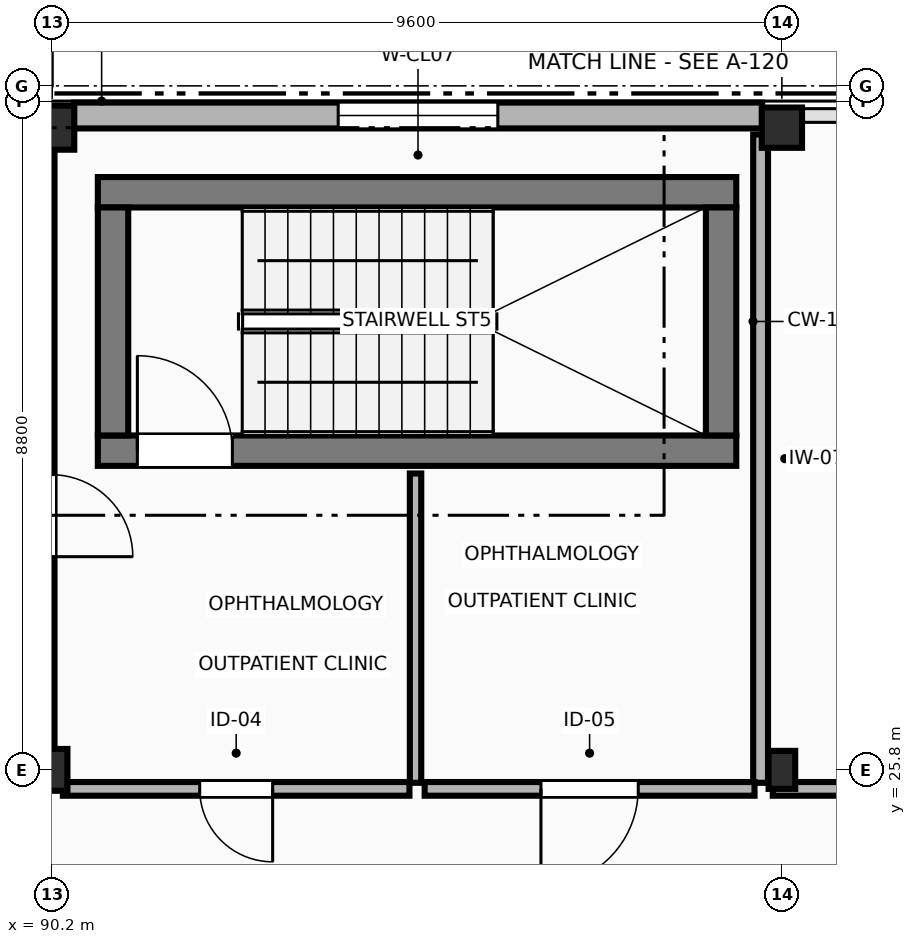
"""IFC4 building model, lengths in metres.
Left out: names, types, materials, properties, quantities, classifications, styles, units other than length and angle.
Written with IfcOpenShell. Run it as: python <this file> out.ifc"""

import sys

from ifc_helpers import new_model, si_unit, direction, frame, frame_2d, origin, origin_2d, place, context, subcontext, project, spatial, rectangle, extrude, element, fill, save


model = new_model("IFC4")
c1 = context("Model", 3, precision=1e-05, world=origin(), true_north=direction((0.0, 1.0)))
c2 = subcontext(c1, "Body", "Model", "MODEL_VIEW")
j1 = project(units=[si_unit("LENGTHUNIT", "METRE"), si_unit("PLANEANGLEUNIT", "RADIAN")], contexts=[c1])
p1 = place(None, origin())
s1 = spatial("IfcSite", under=j1, at=p1, CompositionType="ELEMENT")
p2 = place(p1, origin())
s2 = spatial("IfcBuilding", under=s1, at=p2, CompositionType="ELEMENT")
p3 = place(p2, frame((0.0, 0.0, 5.4)))
s3 = spatial("IfcBuildingStorey", under=s2, at=p3, CompositionType="ELEMENT", Elevation=5.4)
p4 = place(p3, frame((90.2, 25.8, 0.0), z_axis=(0.0, 0.0, 1.0), x_axis=(1.0, 0.0, 0.0)))
e1 = element("IfcColumn", 1, at=p4, inside=s3, PredefinedType="COLUMN", context=c2, shape_type="SweptSolid", body=[
    extrude(rectangle(XDim=0.4, YDim=0.55, at=origin_2d()), origin(), (0.0, 0.0, 1.0), 4.2),
])
p5 = place(p3, frame((90.2, 34.25, 0.0), z_axis=(0.0, 0.0, 1.0), x_axis=(1.0, 0.0, 0.0)))
e2 = element("IfcColumn", 2, at=p5, inside=s3, PredefinedType="COLUMN", context=c2, shape_type="SweptSolid", body=[
    extrude(rectangle(XDim=0.58, YDim=0.58, at=origin_2d()), origin(), (0.0, 0.0, 1.0), 4.2),
])
p6 = place(p3, frame((99.8, 25.8, 0.0), z_axis=(0.0, 0.0, 1.0), x_axis=(1.0, 0.0, 0.0)))
e3 = element("IfcColumn", 3, at=p6, inside=s3, PredefinedType="COLUMN", context=c2, shape_type="SweptSolid", body=[
    extrude(rectangle(XDim=0.35, YDim=0.5, at=origin_2d()), origin(), (0.0, 0.0, 1.0), 4.2),
])
p7 = place(p3, frame((99.8, 34.25, 0.0), z_axis=(0.0, 0.0, 1.0), x_axis=(1.0, 0.0, 0.0)))
e4 = element("IfcColumn", 4, at=p7, inside=s3, PredefinedType="COLUMN", context=c2, shape_type="SweptSolid", body=[
    extrude(rectangle(XDim=0.53, YDim=0.53, at=origin_2d()), origin(), (0.0, 0.0, 1.0), 4.2),
])
p8 = place(p3, frame((99.54, 34.41, 0.0), z_axis=(0.0, 0.0, 1.0), x_axis=(-1.0, 0.0, 0.0)))
e5 = element("IfcWall", 5, at=p8, inside=s3, PredefinedType="STANDARD", context=c2, shape_type="SweptSolid", body=[
    extrude(rectangle(XDim=9.055, YDim=0.34, at=frame_2d((4.527, 0.0))), origin(), (0.0, 0.0, 1.0), 3.185),
])
p9 = place(p8, frame((3.478, 0.0, 0.95)))
e6 = element("IfcOpeningElement", 6, at=p9, cuts=e5, PredefinedType="OPENING", context=c2, shape_type="SweptSolid", body=[
    extrude(rectangle(XDim=2.1, YDim=1.8, at=frame_2d((1.05, 0.9))), frame((0.0, 0.18, 0.0), z_axis=(0.0, -1.0, 0.0), x_axis=(1.0, 0.0, 0.0)), (0.0, 0.0, 1.0), 0.36),
])
p10 = place(p3, frame((90.8, 30.0, 0.0), z_axis=(0.0, 0.0, 1.0), x_axis=(1.0, 0.0, 0.0)))
e7 = element("IfcWall", 7, at=p10, inside=s3, PredefinedType="SHEAR", context=c2, shape_type="SweptSolid", body=[
    extrude(rectangle(XDim=8.4, YDim=0.4, at=frame_2d((4.2, 0.0))), origin(), (0.0, 0.0, 1.0), 3.92),
])
p11 = place(p10, frame((0.52, 0.0, 0.0)))
e8 = element("IfcOpeningElement", 8, at=p11, cuts=e7, PredefinedType="OPENING", context=c2, shape_type="SweptSolid", body=[
    extrude(rectangle(XDim=1.25, YDim=2.2, at=frame_2d((0.625, 1.1))), frame((0.0, 0.21, 0.0), z_axis=(0.0, -1.0, 0.0), x_axis=(1.0, 0.0, 0.0)), (0.0, 0.0, 1.0), 0.42),
])
p12 = place(p3, frame((99.2, 33.4, 0.0), z_axis=(0.0, 0.0, 1.0), x_axis=(-1.0, 0.0, 0.0)))
e9 = element("IfcWall", 9, at=p12, inside=s3, PredefinedType="SHEAR", context=c2, shape_type="SweptSolid", body=[
    extrude(rectangle(XDim=8.4, YDim=0.4, at=frame_2d((4.2, 0.0))), origin(), (0.0, 0.0, 1.0), 3.92),
])
for number, where, z_axis, x_axis in (
    (10, (91.0, 30.2, 0.0), (0.0, 0.0, 1.0), (0.0, 1.0, 0.0)),
    (11, (99.0, 33.2, 0.0), (0.0, 0.0, 1.0), (0.0, -1.0, 0.0)),
):
    element("IfcWall", number, at=place(p3, frame(where, z_axis=z_axis, x_axis=x_axis)), inside=s3, PredefinedType="SHEAR", context=c2, shape_type="SweptSolid", body=[
        extrude(rectangle(XDim=3.0, YDim=0.4, at=frame_2d((1.5, 0.0))), origin(), (0.0, 0.0, 1.0), 3.92),
    ])
p13 = place(p3, frame((90.18, 34.16, 0.0), z_axis=(0.0, 0.0, 1.0), x_axis=(0.0, -1.0, 0.0)))
e12 = element("IfcWall", 12, at=p13, inside=s3, PredefinedType="PARTITIONING", context=c2, shape_type="SweptSolid", body=[
    extrude(rectangle(XDim=8.53, YDim=0.1, at=frame_2d((4.265, 0.0))), origin(), (0.0, 0.0, 1.0), 3.365),
])
p14 = place(p13, frame((4.475, 0.0, 0.0)))
e13 = element("IfcOpeningElement", 13, at=p14, cuts=e12, PredefinedType="OPENING", context=c2, shape_type="SweptSolid", body=[
    extrude(rectangle(XDim=1.08, YDim=2.2, at=frame_2d((0.54, 1.1))), frame((0.0, 0.06, 0.0), z_axis=(0.0, -1.0, 0.0), x_axis=(1.0, 0.0, 0.0)), (0.0, 0.0, 1.0), 0.12),
])
p15 = place(p3, frame((94.98, 29.7, 0.0), z_axis=(0.0, 0.0, 1.0), x_axis=(0.0, -1.0, 0.0)))
e14 = element("IfcWall", 14, at=p15, inside=s3, PredefinedType="PARTITIONING", context=c2, shape_type="SweptSolid", body=[
    extrude(rectangle(XDim=4.07, YDim=0.15, at=frame_2d((2.035, 0.0))), origin(), (0.0, 0.0, 1.0), 3.92),
])
p16 = place(p3, frame((94.9, 25.55, 0.0), z_axis=(0.0, 0.0, 1.0), x_axis=(-1.0, 0.0, 0.0)))
e15 = element("IfcWall", 15, at=p16, inside=s3, PredefinedType="PARTITIONING", context=c2, shape_type="SweptSolid", body=[
    extrude(rectangle(XDim=4.56, YDim=0.18, at=frame_2d((2.28, 0.0))), origin(), (0.0, 0.0, 1.0), 3.225),
])
p17 = place(p16, frame((1.8, 0.0, 0.0)))
e16 = element("IfcOpeningElement", 16, at=p17, cuts=e15, PredefinedType="OPENING", context=c2, shape_type="SweptSolid", body=[
    extrude(rectangle(XDim=0.96, YDim=2.1, at=frame_2d((0.48, 1.05))), frame((0.0, 0.1, 0.0), z_axis=(0.0, -1.0, 0.0), x_axis=(1.0, 0.0, 0.0)), (0.0, 0.0, 1.0), 0.2),
])
p18 = place(p3, frame((99.52, 34.16, 0.0), z_axis=(0.0, 0.0, 1.0), x_axis=(0.0, -1.0, 0.0)))
e17 = element("IfcWall", 17, at=p18, inside=s3, PredefinedType="PARTITIONING", context=c2, shape_type="SweptSolid", body=[
    extrude(rectangle(XDim=8.53, YDim=0.195, at=frame_2d((4.265, 0.0))), origin(), (0.0, 0.0, 1.0), 3.405),
])
p19 = place(p3, frame((99.44, 25.55, 0.0), z_axis=(0.0, 0.0, 1.0), x_axis=(-1.0, 0.0, 0.0)))
e18 = element("IfcWall", 18, at=p19, inside=s3, PredefinedType="PARTITIONING", context=c2, shape_type="SweptSolid", body=[
    extrude(rectangle(XDim=4.34, YDim=0.18, at=frame_2d((2.17, 0.0))), origin(), (0.0, 0.0, 1.0), 3.225),
])
p20 = place(p19, frame((1.53, 0.0, 0.0)))
e19 = element("IfcOpeningElement", 19, at=p20, cuts=e18, PredefinedType="OPENING", context=c2, shape_type="SweptSolid", body=[
    extrude(rectangle(XDim=1.28, YDim=2.25, at=frame_2d((0.64, 1.125))), frame((0.0, 0.1, 0.0), z_axis=(0.0, -1.0, 0.0), x_axis=(1.0, 0.0, 0.0)), (0.0, 0.0, 1.0), 0.2),
])
p21 = place(p3, frame((108.78, 25.55, 0.0), z_axis=(0.0, 0.0, 1.0), x_axis=(-1.0, 0.0, 0.0)))
e20 = element("IfcWall", 20, at=p21, inside=s3, PredefinedType="PARTITIONING", context=c2, shape_type="SweptSolid", body=[
    extrude(rectangle(XDim=9.1, YDim=0.18, at=frame_2d((4.55, 0.0))), origin(), (0.0, 0.0, 1.0), 3.225),
])
p22 = place(p21, frame((3.86, 0.0, 0.0)))
e21 = element("IfcOpeningElement", 21, at=p22, cuts=e20, PredefinedType="OPENING", context=c2, shape_type="SweptSolid", body=[
    extrude(rectangle(XDim=1.38, YDim=2.25, at=frame_2d((0.69, 1.125))), frame((0.0, 0.1, 0.0), z_axis=(0.0, -1.0, 0.0), x_axis=(1.0, 0.0, 0.0)), (0.0, 0.0, 1.0), 0.2),
])
p23 = place(p9, origin())
e22 = element("IfcWindow", 22, at=p23, inside=s3, PartitioningType="SINGLE_PANEL", PredefinedType="WINDOW", context=c2, shape_type="SweptSolid", body=[
    extrude(rectangle(XDim=2.1, YDim=1.8, at=frame_2d((1.05, 0.9))), frame((0.0, 0.03, 0.0), z_axis=(0.0, -1.0, 0.0), x_axis=(1.0, 0.0, 0.0)), (0.0, 0.0, 1.0), 0.06),
])
fill(e6, e22)
p24 = place(p11, origin())
e23 = element("IfcDoor", 23, at=p24, inside=s3, OperationType="SINGLE_SWING_LEFT", PredefinedType="DOOR", context=c2, shape_type="SweptSolid", body=[
    extrude(rectangle(XDim=1.25, YDim=2.2, at=frame_2d((0.625, 1.1))), frame((0.0, 0.025, 0.0), z_axis=(0.0, -1.0, 0.0), x_axis=(1.0, 0.0, 0.0)), (0.0, 0.0, 1.0), 0.05),
])
fill(e8, e23)
p25 = place(p14, origin())
e24 = element("IfcDoor", 24, at=p25, inside=s3, OperationType="SINGLE_SWING_RIGHT", PredefinedType="DOOR", context=c2, shape_type="SweptSolid", body=[
    extrude(rectangle(XDim=1.08, YDim=2.2, at=frame_2d((0.54, 1.1))), frame((0.0, 0.025, 0.0), z_axis=(0.0, -1.0, 0.0), x_axis=(1.0, 0.0, 0.0)), (0.0, 0.0, 1.0), 0.05),
])
fill(e13, e24)
p26 = place(p17, origin())
e25 = element("IfcDoor", 25, at=p26, inside=s3, OperationType="SINGLE_SWING_LEFT", PredefinedType="DOOR", context=c2, shape_type="SweptSolid", body=[
    extrude(rectangle(XDim=0.96, YDim=2.1, at=frame_2d((0.48, 1.05))), frame((0.0, 0.025, 0.0), z_axis=(0.0, -1.0, 0.0), x_axis=(1.0, 0.0, 0.0)), (0.0, 0.0, 1.0), 0.05),
])
fill(e16, e25)
p27 = place(p20, origin())
e26 = element("IfcDoor", 26, at=p27, inside=s3, OperationType="SINGLE_SWING_RIGHT", PredefinedType="DOOR", context=c2, shape_type="SweptSolid", body=[
    extrude(rectangle(XDim=1.28, YDim=2.25, at=frame_2d((0.64, 1.125))), frame((0.0, 0.025, 0.0), z_axis=(0.0, -1.0, 0.0), x_axis=(1.0, 0.0, 0.0)), (0.0, 0.0, 1.0), 0.05),
])
fill(e19, e26)
save(model, sys.argv[1])
